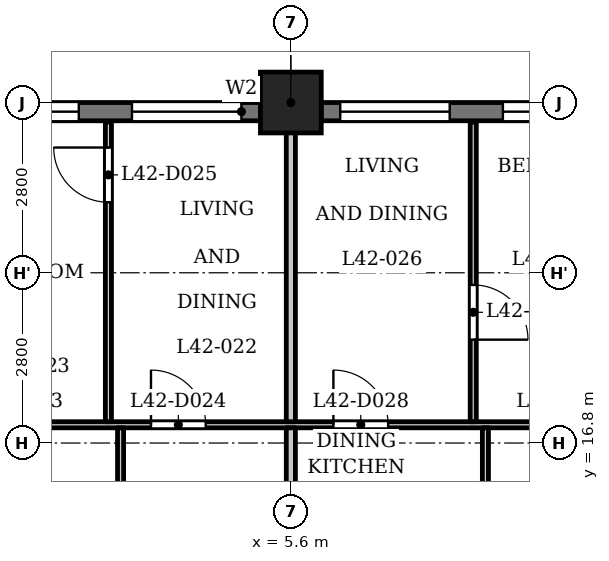
"""IFC4 building model, lengths in metres.
Left out: names, types, materials, properties, quantities, classifications, styles, units other than length and angle.
Written with IfcOpenShell. Run it as: python <this file> out.ifc"""

import sys

from ifc_helpers import new_model, si_unit, direction, frame, frame_2d, origin, origin_2d, place, context, subcontext, project, spatial, rectangle, extrude, element, fill, save


model = new_model("IFC4")
c1 = context("Model", 3, precision=1e-05, world=origin(), true_north=direction((0.0, 1.0)))
c2 = subcontext(c1, "Body", "Model", "MODEL_VIEW")
j1 = project(units=[si_unit("LENGTHUNIT", "METRE"), si_unit("PLANEANGLEUNIT", "RADIAN")], contexts=[c1])
p1 = place(None, origin())
s1 = spatial("IfcSite", under=j1, at=p1, CompositionType="ELEMENT")
p2 = place(p1, origin())
s2 = spatial("IfcBuilding", under=s1, at=p2, CompositionType="ELEMENT")
p3 = place(p2, frame((0.0, 0.0, 164.1)))
s3 = spatial("IfcBuildingStorey", under=s2, at=p3, CompositionType="ELEMENT", Elevation=164.1)
p4 = place(p3, frame((5.6, 22.4, 0.0), z_axis=(0.0, 0.0, 1.0), x_axis=(1.0, 0.0, 0.0)))
e1 = element("IfcColumn", 1, at=p4, inside=s3, PredefinedType="COLUMN", context=c2, shape_type="SweptSolid", body=[
    extrude(rectangle(XDim=1.0, YDim=1.0, at=origin_2d()), origin(), (0.0, 0.0, 1.0), 3.5),
])
p5 = place(p3, frame((10.7, 22.25, 0.0), z_axis=(0.0, 0.0, 1.0), x_axis=(-1.0, 0.0, 0.0)))
e2 = element("IfcWall", 2, at=p5, inside=s3, PredefinedType="SOLIDWALL", context=c2, shape_type="SweptSolid", body=[
    extrude(rectangle(XDim=4.6, YDim=0.3, at=frame_2d((2.3, 0.0))), origin(), (0.0, 0.0, 1.0), 2.45),
])
p6 = place(p5, frame((0.413, 0.0, 0.6)))
e3 = element("IfcOpeningElement", 3, at=p6, cuts=e2, PredefinedType="OPENING", context=c2, shape_type="SweptSolid", body=[
    extrude(rectangle(XDim=1.2, YDim=1.55, at=frame_2d((0.6, 0.775))), frame((0.0, 0.16, 0.0), z_axis=(0.0, -1.0, 0.0), x_axis=(1.0, 0.0, 0.0)), (0.0, 0.0, 1.0), 0.32),
])
p7 = place(p5, frame((2.488, 0.0, 0.9)))
e4 = element("IfcOpeningElement", 4, at=p7, cuts=e2, PredefinedType="OPENING", context=c2, shape_type="SweptSolid", body=[
    extrude(rectangle(XDim=1.8, YDim=1.25, at=frame_2d((0.9, 0.625))), frame((0.0, 0.16, 0.0), z_axis=(0.0, -1.0, 0.0), x_axis=(1.0, 0.0, 0.0)), (0.0, 0.0, 1.0), 0.32),
])
p8 = place(p3, frame((5.1, 22.25, 0.0), z_axis=(0.0, 0.0, 1.0), x_axis=(-1.0, 0.0, 0.0)))
e5 = element("IfcWall", 5, at=p8, inside=s3, PredefinedType="SOLIDWALL", context=c2, shape_type="SweptSolid", body=[
    extrude(rectangle(XDim=4.6, YDim=0.3, at=frame_2d((2.3, 0.0))), origin(), (0.0, 0.0, 1.0), 2.45),
])
p9 = place(p8, frame((0.312, 0.0, 0.9)))
e6 = element("IfcOpeningElement", 6, at=p9, cuts=e5, PredefinedType="OPENING", context=c2, shape_type="SweptSolid", body=[
    extrude(rectangle(XDim=1.8, YDim=1.25, at=frame_2d((0.9, 0.625))), frame((0.0, 0.16, 0.0), z_axis=(0.0, -1.0, 0.0), x_axis=(1.0, 0.0, 0.0)), (0.0, 0.0, 1.0), 0.32),
])
p10 = place(p8, frame((2.988, 0.0, 0.6)))
e7 = element("IfcOpeningElement", 7, at=p10, cuts=e5, PredefinedType="OPENING", context=c2, shape_type="SweptSolid", body=[
    extrude(rectangle(XDim=1.2, YDim=1.55, at=frame_2d((0.6, 0.775))), frame((0.0, 0.16, 0.0), z_axis=(0.0, -1.0, 0.0), x_axis=(1.0, 0.0, 0.0)), (0.0, 0.0, 1.0), 0.32),
])
p11 = place(p3, frame((-16.725, 17.1, 0.0), z_axis=(0.0, 0.0, 1.0), x_axis=(1.0, 0.0, 0.0)))
e8 = element("IfcWall", 8, at=p11, inside=s3, PredefinedType="PARTITIONING", context=c2, shape_type="SweptSolid", body=[
    extrude(rectangle(XDim=33.45, YDim=0.1, at=frame_2d((16.725, 0.0))), origin(), (0.0, 0.0, 1.0), 3.2),
])
p12 = place(p11, frame((11.925, 0.0, 0.0)))
e9 = element("IfcOpeningElement", 9, at=p12, cuts=e8, PredefinedType="OPENING", context=c2, shape_type="SweptSolid", body=[
    extrude(rectangle(XDim=0.9, YDim=2.1, at=frame_2d((0.45, 1.05))), frame((0.0, 0.06, 0.0), z_axis=(0.0, -1.0, 0.0), x_axis=(1.0, 0.0, 0.0)), (0.0, 0.0, 1.0), 0.12),
])
p13 = place(p11, frame((15.175, 0.0, 0.0)))
e10 = element("IfcOpeningElement", 10, at=p13, cuts=e8, PredefinedType="OPENING", context=c2, shape_type="SweptSolid", body=[
    extrude(rectangle(XDim=0.9, YDim=2.1, at=frame_2d((0.45, 1.05))), frame((0.0, 0.06, 0.0), z_axis=(0.0, -1.0, 0.0), x_axis=(1.0, 0.0, 0.0)), (0.0, 0.0, 1.0), 0.12),
])
p14 = place(p11, frame((6.575, 0.0, 0.0)))
e11 = element("IfcOpeningElement", 11, at=p14, cuts=e8, PredefinedType="OPENING", context=c2, shape_type="SweptSolid", body=[
    extrude(rectangle(XDim=0.9, YDim=2.1, at=frame_2d((0.45, 1.05))), frame((0.0, 0.06, 0.0), z_axis=(0.0, -1.0, 0.0), x_axis=(1.0, 0.0, 0.0)), (0.0, 0.0, 1.0), 0.12),
])
p15 = place(p11, frame((17.375, 0.0, 0.0)))
e12 = element("IfcOpeningElement", 12, at=p15, cuts=e8, PredefinedType="OPENING", context=c2, shape_type="SweptSolid", body=[
    extrude(rectangle(XDim=0.8, YDim=2.1, at=frame_2d((0.4, 1.05))), frame((0.0, 0.06, 0.0), z_axis=(0.0, -1.0, 0.0), x_axis=(1.0, 0.0, 0.0)), (0.0, 0.0, 1.0), 0.12),
])
p16 = place(p11, frame((20.025, 0.0, 0.0)))
e13 = element("IfcOpeningElement", 13, at=p16, cuts=e8, PredefinedType="OPENING", context=c2, shape_type="SweptSolid", body=[
    extrude(rectangle(XDim=0.9, YDim=2.1, at=frame_2d((0.45, 1.05))), frame((0.0, 0.06, 0.0), z_axis=(0.0, -1.0, 0.0), x_axis=(1.0, 0.0, 0.0)), (0.0, 0.0, 1.0), 0.12),
])
p17 = place(p11, frame((26.425, 0.0, 0.0)))
e14 = element("IfcOpeningElement", 14, at=p17, cuts=e8, PredefinedType="OPENING", context=c2, shape_type="SweptSolid", body=[
    extrude(rectangle(XDim=0.8, YDim=2.1, at=frame_2d((0.4, 1.05))), frame((0.0, 0.06, 0.0), z_axis=(0.0, -1.0, 0.0), x_axis=(1.0, 0.0, 0.0)), (0.0, 0.0, 1.0), 0.12),
])
p18 = place(p11, frame((23.025, 0.0, 0.0)))
e15 = element("IfcOpeningElement", 15, at=p18, cuts=e8, PredefinedType="OPENING", context=c2, shape_type="SweptSolid", body=[
    extrude(rectangle(XDim=0.9, YDim=2.1, at=frame_2d((0.45, 1.05))), frame((0.0, 0.06, 0.0), z_axis=(0.0, -1.0, 0.0), x_axis=(1.0, 0.0, 0.0)), (0.0, 0.0, 1.0), 0.12),
])
p19 = place(p11, frame((28.575, 0.0, 0.0)))
e16 = element("IfcOpeningElement", 16, at=p19, cuts=e8, PredefinedType="OPENING", context=c2, shape_type="SweptSolid", body=[
    extrude(rectangle(XDim=0.8, YDim=2.1, at=frame_2d((0.4, 1.05))), frame((0.0, 0.06, 0.0), z_axis=(0.0, -1.0, 0.0), x_axis=(1.0, 0.0, 0.0)), (0.0, 0.0, 1.0), 0.12),
])
p20 = place(p11, frame((30.725, 0.0, 0.0)))
e17 = element("IfcOpeningElement", 17, at=p20, cuts=e8, PredefinedType="OPENING", context=c2, shape_type="SweptSolid", body=[
    extrude(rectangle(XDim=0.9, YDim=2.1, at=frame_2d((0.45, 1.05))), frame((0.0, 0.06, 0.0), z_axis=(0.0, -1.0, 0.0), x_axis=(1.0, 0.0, 0.0)), (0.0, 0.0, 1.0), 0.12),
])
p21 = place(p3, frame((2.6, 17.15, 0.0), z_axis=(0.0, 0.0, 1.0), x_axis=(0.0, 1.0, 0.0)))
e18 = element("IfcWall", 18, at=p21, inside=s3, PredefinedType="PARTITIONING", context=c2, shape_type="SweptSolid", body=[
    extrude(rectangle(XDim=4.93, YDim=0.1, at=frame_2d((2.465, 0.0))), origin(), (0.0, 0.0, 1.0), 3.2),
])
p22 = place(p21, frame((3.61, 0.0, 0.0)))
e19 = element("IfcOpeningElement", 19, at=p22, cuts=e18, PredefinedType="OPENING", context=c2, shape_type="SweptSolid", body=[
    extrude(rectangle(XDim=0.9, YDim=2.1, at=frame_2d((0.45, 1.05))), frame((0.0, 0.06, 0.0), z_axis=(0.0, -1.0, 0.0), x_axis=(1.0, 0.0, 0.0)), (0.0, 0.0, 1.0), 0.12),
])
p23 = place(p3, frame((2.8, 13.275, 0.0), z_axis=(0.0, 0.0, 1.0), x_axis=(0.0, 1.0, 0.0)))
e20 = element("IfcWall", 20, at=p23, inside=s3, PredefinedType="PARTITIONING", context=c2, shape_type="SweptSolid", body=[
    extrude(rectangle(XDim=3.775, YDim=0.1, at=frame_2d((1.888, 0.0))), origin(), (0.0, 0.0, 1.0), 3.2),
])
p24 = place(p3, frame((5.6, 13.275, 0.0), z_axis=(0.0, 0.0, 1.0), x_axis=(0.0, 1.0, 0.0)))
e21 = element("IfcWall", 21, at=p24, inside=s3, PredefinedType="PARTITIONING", context=c2, shape_type="SweptSolid", body=[
    extrude(rectangle(XDim=3.775, YDim=0.15, at=frame_2d((1.888, 0.0))), origin(), (0.0, 0.0, 1.0), 3.2),
])
p25 = place(p3, frame((5.6, 17.15, 0.0), z_axis=(0.0, 0.0, 1.0), x_axis=(0.0, 1.0, 0.0)))
e22 = element("IfcWall", 22, at=p25, inside=s3, PredefinedType="PARTITIONING", context=c2, shape_type="SweptSolid", body=[
    extrude(rectangle(XDim=5.73, YDim=0.15, at=frame_2d((2.865, 0.0))), origin(), (0.0, 0.0, 1.0), 3.2),
])
p26 = place(p3, frame((8.6, 17.15, 0.0), z_axis=(0.0, 0.0, 1.0), x_axis=(0.0, 1.0, 0.0)))
e23 = element("IfcWall", 23, at=p26, inside=s3, PredefinedType="PARTITIONING", context=c2, shape_type="SweptSolid", body=[
    extrude(rectangle(XDim=4.93, YDim=0.1, at=frame_2d((2.465, 0.0))), origin(), (0.0, 0.0, 1.0), 3.2),
])
p27 = place(p26, frame((1.35, 0.0, 0.0)))
e24 = element("IfcOpeningElement", 24, at=p27, cuts=e23, PredefinedType="OPENING", context=c2, shape_type="SweptSolid", body=[
    extrude(rectangle(XDim=0.9, YDim=2.1, at=frame_2d((0.45, 1.05))), frame((0.0, 0.06, 0.0), z_axis=(0.0, -1.0, 0.0), x_axis=(1.0, 0.0, 0.0)), (0.0, 0.0, 1.0), 0.12),
])
p28 = place(p3, frame((8.8, 13.275, 0.0), z_axis=(0.0, 0.0, 1.0), x_axis=(0.0, 1.0, 0.0)))
e25 = element("IfcWall", 25, at=p28, inside=s3, PredefinedType="PARTITIONING", context=c2, shape_type="SweptSolid", body=[
    extrude(rectangle(XDim=3.775, YDim=0.1, at=frame_2d((1.888, 0.0))), origin(), (0.0, 0.0, 1.0), 3.2),
])
p29 = place(p16, origin())
e26 = element("IfcDoor", 26, at=p29, inside=s3, OperationType="SINGLE_SWING_RIGHT", PredefinedType="DOOR", context=c2, shape_type="SweptSolid", body=[
    extrude(rectangle(XDim=0.9, YDim=2.1, at=frame_2d((0.45, 1.05))), frame((0.0, 0.025, 0.0), z_axis=(0.0, -1.0, 0.0), x_axis=(1.0, 0.0, 0.0)), (0.0, 0.0, 1.0), 0.05),
])
fill(e13, e26)
p30 = place(p22, origin())
e27 = element("IfcDoor", 27, at=p30, inside=s3, OperationType="SINGLE_SWING_LEFT", PredefinedType="DOOR", context=c2, shape_type="SweptSolid", body=[
    extrude(rectangle(XDim=0.9, YDim=2.1, at=frame_2d((0.45, 1.05))), frame((0.0, 0.025, 0.0), z_axis=(0.0, -1.0, 0.0), x_axis=(1.0, 0.0, 0.0)), (0.0, 0.0, 1.0), 0.05),
])
fill(e19, e27)
p31 = place(p18, origin())
e28 = element("IfcDoor", 28, at=p31, inside=s3, OperationType="SINGLE_SWING_RIGHT", PredefinedType="DOOR", context=c2, shape_type="SweptSolid", body=[
    extrude(rectangle(XDim=0.9, YDim=2.1, at=frame_2d((0.45, 1.05))), frame((0.0, 0.025, 0.0), z_axis=(0.0, -1.0, 0.0), x_axis=(1.0, 0.0, 0.0)), (0.0, 0.0, 1.0), 0.05),
])
fill(e15, e28)
p32 = place(p27, origin())
e29 = element("IfcDoor", 29, at=p32, inside=s3, OperationType="SINGLE_SWING_LEFT", PredefinedType="DOOR", context=c2, shape_type="SweptSolid", body=[
    extrude(rectangle(XDim=0.9, YDim=2.1, at=frame_2d((0.45, 1.05))), frame((0.0, 0.025, 0.0), z_axis=(0.0, -1.0, 0.0), x_axis=(1.0, 0.0, 0.0)), (0.0, 0.0, 1.0), 0.05),
])
fill(e24, e29)
p33 = place(p6, origin())
e30 = element("IfcWindow", 30, at=p33, inside=s3, PartitioningType="SINGLE_PANEL", PredefinedType="WINDOW", context=c2, shape_type="SweptSolid", body=[
    extrude(rectangle(XDim=1.2, YDim=1.55, at=frame_2d((0.6, 0.775))), frame((0.0, 0.03, 0.0), z_axis=(0.0, -1.0, 0.0), x_axis=(1.0, 0.0, 0.0)), (0.0, 0.0, 1.0), 0.06),
])
fill(e3, e30)
p34 = place(p7, origin())
e31 = element("IfcWindow", 31, at=p34, inside=s3, PartitioningType="SINGLE_PANEL", PredefinedType="WINDOW", context=c2, shape_type="SweptSolid", body=[
    extrude(rectangle(XDim=1.8, YDim=1.25, at=frame_2d((0.9, 0.625))), frame((0.0, 0.03, 0.0), z_axis=(0.0, -1.0, 0.0), x_axis=(1.0, 0.0, 0.0)), (0.0, 0.0, 1.0), 0.06),
])
fill(e4, e31)
p35 = place(p9, origin())
e32 = element("IfcWindow", 32, at=p35, inside=s3, PartitioningType="SINGLE_PANEL", PredefinedType="WINDOW", context=c2, shape_type="SweptSolid", body=[
    extrude(rectangle(XDim=1.8, YDim=1.25, at=frame_2d((0.9, 0.625))), frame((0.0, 0.03, 0.0), z_axis=(0.0, -1.0, 0.0), x_axis=(1.0, 0.0, 0.0)), (0.0, 0.0, 1.0), 0.06),
])
fill(e6, e32)
p36 = place(p10, origin())
e33 = element("IfcWindow", 33, at=p36, inside=s3, PartitioningType="SINGLE_PANEL", PredefinedType="WINDOW", context=c2, shape_type="SweptSolid", body=[
    extrude(rectangle(XDim=1.2, YDim=1.55, at=frame_2d((0.6, 0.775))), frame((0.0, 0.03, 0.0), z_axis=(0.0, -1.0, 0.0), x_axis=(1.0, 0.0, 0.0)), (0.0, 0.0, 1.0), 0.06),
])
fill(e7, e33)
save(model, sys.argv[1])
